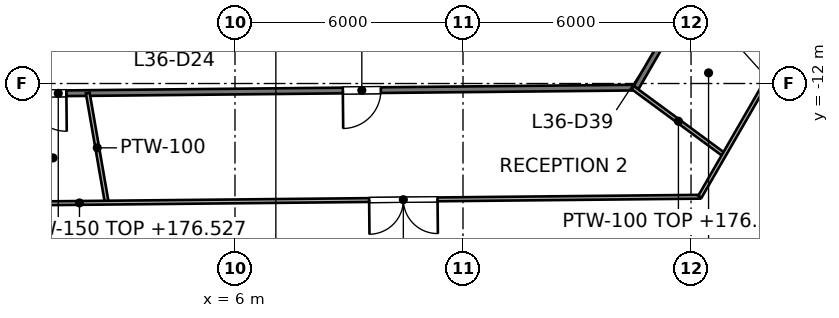
"""IFC4 building model, lengths in metres.
Left out: names, types, materials, properties, quantities, classifications, styles, units other than length and angle.
Written with IfcOpenShell. Run it as: python <this file> out.ifc"""

import sys

from ifc_helpers import new_model, si_unit, direction, frame, frame_2d, origin, place, context, subcontext, project, spatial, rectangle, extrude, element, fill, save


model = new_model("IFC4")
c1 = context("Model", 3, precision=1e-05, world=origin(), true_north=direction((0.0, 1.0)))
c2 = subcontext(c1, "Body", "Model", "MODEL_VIEW")
j1 = project(units=[si_unit("LENGTHUNIT", "METRE"), si_unit("PLANEANGLEUNIT", "RADIAN")], contexts=[c1])
p1 = place(None, origin())
s1 = spatial("IfcSite", under=j1, at=p1, CompositionType="ELEMENT")
p2 = place(p1, origin())
s2 = spatial("IfcBuilding", under=s1, at=p2, CompositionType="ELEMENT")
p3 = place(p2, frame((0.0, 0.0, 173.6)))
s3 = spatial("IfcBuildingStorey", under=s2, at=p3, CompositionType="ELEMENT", Elevation=173.6)
p4 = place(p3, frame((-13.855, -12.409, 0.0), z_axis=(0.0, 0.0, 1.0), x_axis=(0.999950929766, 0.009906465589, 0.0)))
e1 = element("IfcWall", 1, at=p4, inside=s3, PredefinedType="PARTITIONING", context=c2, shape_type="SweptSolid", body=[
    extrude(rectangle(XDim=30.411, YDim=0.15, at=frame_2d((15.206, 0.0))), origin(), (0.0, 0.0, 1.0), 2.927),
])
p5 = place(p4, frame((2.547, 0.0, 0.0)))
e2 = element("IfcOpeningElement", 2, at=p5, cuts=e1, PredefinedType="OPENING", context=c2, shape_type="SweptSolid", body=[
    extrude(rectangle(XDim=1.0, YDim=2.1, at=frame_2d((0.5, 1.05))), frame((0.0, 0.075, 0.0), z_axis=(0.0, -1.0, 0.0), x_axis=(1.0, 0.0, 0.0)), (0.0, 0.0, 1.0), 0.15),
])
p6 = place(p4, frame((9.526, 0.0, 0.0)))
e3 = element("IfcOpeningElement", 3, at=p6, cuts=e1, PredefinedType="OPENING", context=c2, shape_type="SweptSolid", body=[
    extrude(rectangle(XDim=1.0, YDim=2.1, at=frame_2d((0.5, 1.05))), frame((0.0, 0.075, 0.0), z_axis=(0.0, -1.0, 0.0), x_axis=(1.0, 0.0, 0.0)), (0.0, 0.0, 1.0), 0.15),
])
p7 = place(p4, frame((14.419, 0.0, 0.0)))
e4 = element("IfcOpeningElement", 4, at=p7, cuts=e1, PredefinedType="OPENING", context=c2, shape_type="SweptSolid", body=[
    extrude(rectangle(XDim=1.0, YDim=2.1, at=frame_2d((0.5, 1.05))), frame((0.0, 0.075, 0.0), z_axis=(0.0, -1.0, 0.0), x_axis=(1.0, 0.0, 0.0)), (0.0, 0.0, 1.0), 0.15),
])
p8 = place(p4, frame((22.694, 0.0, 0.0)))
e5 = element("IfcOpeningElement", 5, at=p8, cuts=e1, PredefinedType="OPENING", context=c2, shape_type="SweptSolid", body=[
    extrude(rectangle(XDim=1.0, YDim=2.1, at=frame_2d((0.5, 1.05))), frame((0.0, 0.075, 0.0), z_axis=(0.0, -1.0, 0.0), x_axis=(1.0, 0.0, 0.0)), (0.0, 0.0, 1.0), 0.15),
])
p9 = place(p3, frame((16.555, -12.107, 0.0), z_axis=(0.0, 0.0, 1.0), x_axis=(0.500279724306, 0.865863844636, 0.0)))
e6 = element("IfcWall", 6, at=p9, inside=s3, PredefinedType="PARTITIONING", context=c2, shape_type="SweptSolid", body=[
    extrude(rectangle(XDim=5.739, YDim=0.15, at=frame_2d((2.869, 0.0))), origin(), (0.0, 0.0, 1.0), 2.995),
])
p10 = place(p9, frame((1.522, 0.0, 0.0)))
e7 = element("IfcOpeningElement", 7, at=p10, cuts=e6, PredefinedType="OPENING", context=c2, shape_type="SweptSolid", body=[
    extrude(rectangle(XDim=1.0, YDim=2.1, at=frame_2d((0.5, 1.05))), frame((0.0, 0.075, 0.0), z_axis=(0.0, -1.0, 0.0), x_axis=(1.0, 0.0, 0.0)), (0.0, 0.0, 1.0), 0.15),
])
p11 = place(p3, frame((2.126, -12.25, 0.0), z_axis=(0.0, 0.0, 1.0), x_axis=(0.17076405782, -0.985311948855, 0.0)))
e8 = element("IfcWall", 8, at=p11, inside=s3, PredefinedType="PARTITIONING", context=c2, shape_type="SweptSolid", body=[
    extrude(rectangle(XDim=2.928, YDim=0.1, at=frame_2d((1.464, 0.0))), origin(), (0.0, 0.0, 1.0), 3.85),
])
p12 = place(p3, frame((16.466, -12.108, 0.0), z_axis=(0.0, 0.0, 1.0), x_axis=(0.805590144162, -0.59247322271, 0.0)))
e9 = element("IfcWall", 9, at=p12, inside=s3, PredefinedType="PARTITIONING", context=c2, shape_type="SweptSolid", body=[
    extrude(rectangle(XDim=2.984, YDim=0.1, at=frame_2d((1.492, 0.0))), origin(), (0.0, 0.0, 1.0), 2.995),
])
p13 = place(p3, frame((-14.417, -15.305, 0.0), z_axis=(0.0, 0.0, 1.0), x_axis=(0.999950476631, 0.009952099574, 0.0)))
e10 = element("IfcWall", 10, at=p13, inside=s3, PredefinedType="PARTITIONING", context=c2, shape_type="SweptSolid", body=[
    extrude(rectangle(XDim=32.652, YDim=0.1, at=frame_2d((16.326, 0.0))), origin(), (0.0, 0.0, 1.0), 2.927),
])
p14 = place(p13, frame((8.672, 0.0, 0.0)))
e11 = element("IfcOpeningElement", 11, at=p14, cuts=e10, PredefinedType="OPENING", context=c2, shape_type="SweptSolid", body=[
    extrude(rectangle(XDim=1.8, YDim=2.1, at=frame_2d((0.9, 1.05))), frame((0.0, 0.05, 0.0), z_axis=(0.0, -1.0, 0.0), x_axis=(1.0, 0.0, 0.0)), (0.0, 0.0, 1.0), 0.1),
])
p15 = place(p13, frame((23.948, 0.0, 0.0)))
e12 = element("IfcOpeningElement", 12, at=p15, cuts=e10, PredefinedType="OPENING", context=c2, shape_type="SweptSolid", body=[
    extrude(rectangle(XDim=1.8, YDim=2.1, at=frame_2d((0.9, 1.05))), frame((0.0, 0.05, 0.0), z_axis=(0.0, -1.0, 0.0), x_axis=(1.0, 0.0, 0.0)), (0.0, 0.0, 1.0), 0.1),
])
p16 = place(p3, frame((18.233, -14.98, 0.0), z_axis=(0.0, 0.0, 1.0), x_axis=(0.499914179464, 0.866074946625, 0.0)))
e13 = element("IfcWall", 13, at=p16, inside=s3, PredefinedType="PARTITIONING", context=c2, shape_type="SweptSolid", body=[
    extrude(rectangle(XDim=8.194, YDim=0.1, at=frame_2d((4.097, 0.0))), origin(), (0.0, 0.0, 1.0), 2.995),
])
p17 = place(p7, origin())
e14 = element("IfcDoor", 14, at=p17, inside=s3, OperationType="SINGLE_SWING_RIGHT", PredefinedType="DOOR", context=c2, shape_type="SweptSolid", body=[
    extrude(rectangle(XDim=1.0, YDim=2.1, at=frame_2d((0.5, 1.05))), frame((0.0, 0.025, 0.0), z_axis=(0.0, -1.0, 0.0), x_axis=(1.0, 0.0, 0.0)), (0.0, 0.0, 1.0), 0.05),
])
fill(e4, e14)
p18 = place(p8, origin())
e15 = element("IfcDoor", 15, at=p18, inside=s3, OperationType="SINGLE_SWING_LEFT", PredefinedType="DOOR", context=c2, shape_type="SweptSolid", body=[
    extrude(rectangle(XDim=1.0, YDim=2.1, at=frame_2d((0.5, 1.05))), frame((0.0, 0.025, 0.0), z_axis=(0.0, -1.0, 0.0), x_axis=(1.0, 0.0, 0.0)), (0.0, 0.0, 1.0), 0.05),
])
fill(e5, e15)
p19 = place(p15, origin())
e16 = element("IfcDoor", 16, at=p19, inside=s3, OperationType="DOUBLE_DOOR_SINGLE_SWING", PredefinedType="DOOR", context=c2, shape_type="SweptSolid", body=[
    extrude(rectangle(XDim=1.8, YDim=2.1, at=frame_2d((0.9, 1.05))), frame((0.0, 0.025, 0.0), z_axis=(0.0, -1.0, 0.0), x_axis=(1.0, 0.0, 0.0)), (0.0, 0.0, 1.0), 0.05),
])
fill(e12, e16)
save(model, sys.argv[1])
